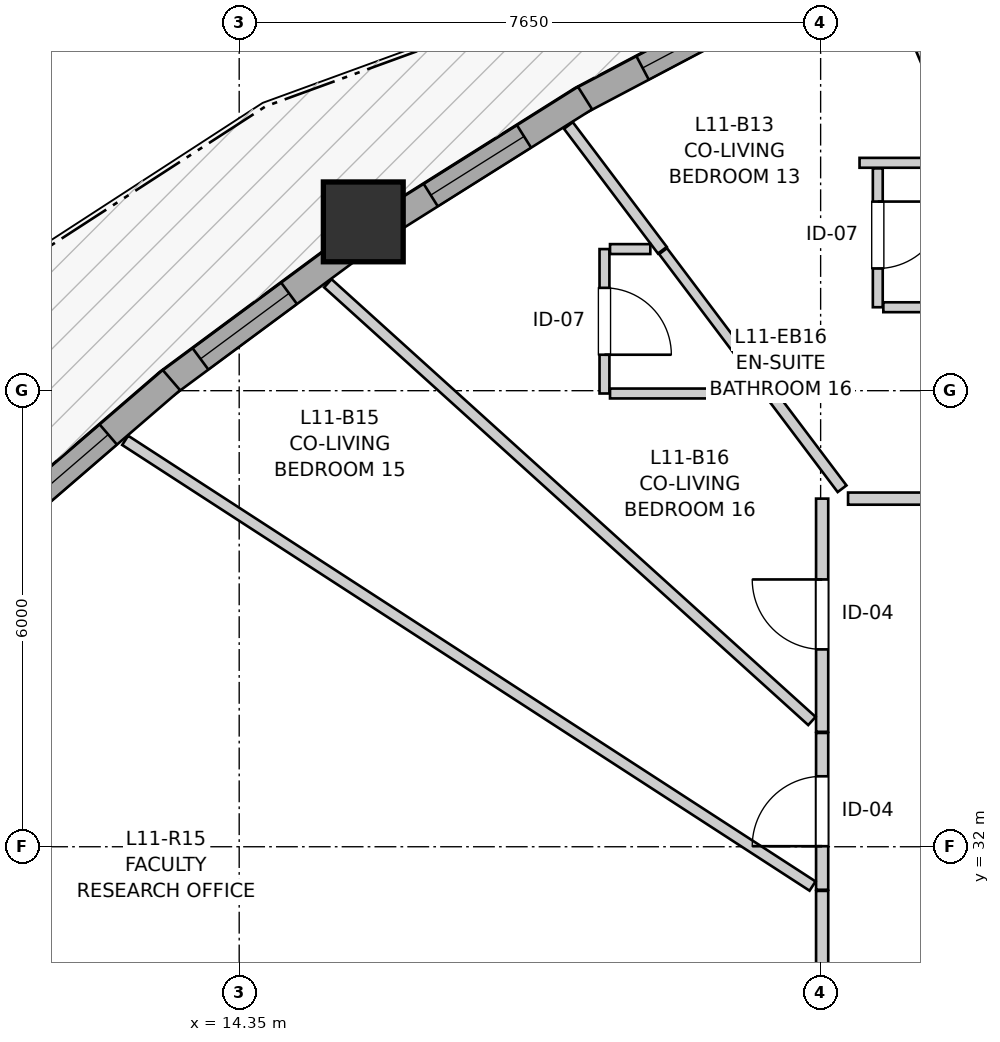
"""IFC4 building model, lengths in metres.
Left out: names, types, materials, properties, quantities, classifications, styles, units other than length and angle.
Written with IfcOpenShell. Run it as: python <this file> out.ifc"""

import sys

from ifc_helpers import new_model, si_unit, direction, frame, frame_2d, origin, origin_2d, place, context, subcontext, project, spatial, rectangle, extrude, source, transform, mapped, element, fill, save


model = new_model("IFC4")
c1 = context("Model", 3, precision=1e-05, world=origin(), true_north=direction((0.0, 1.0)))
c2 = subcontext(c1, "Body", "Model", "MODEL_VIEW")
j1 = project(units=[si_unit("LENGTHUNIT", "METRE"), si_unit("PLANEANGLEUNIT", "RADIAN")], contexts=[c1])
p1 = place(None, origin())
s1 = spatial("IfcSite", under=j1, at=p1, CompositionType="ELEMENT")
p2 = place(p1, origin())
s2 = spatial("IfcBuilding", under=s1, at=p2, CompositionType="ELEMENT")
p3 = place(p2, frame((0.0, 0.0, 39.8)))
s3 = spatial("IfcBuildingStorey", under=s2, at=p3, CompositionType="ELEMENT", Elevation=39.8)
m1 = source(origin(), c2, "Body", "SweptSolid", [
    extrude(rectangle(XDim=1.05, YDim=1.05, at=origin_2d()), origin(), (0.0, 0.0, 1.0), 2.94),
])
p4 = place(p3, frame((15.983, 40.221, 0.0), z_axis=(0.0, 0.0, 1.0), x_axis=(1.0, 0.0, 0.0)))
e1 = element("IfcColumn", 1, at=p4, inside=s3, PredefinedType="COLUMN", context=c2, shape_type="MappedRepresentation", body=[
    mapped(m1, transform((0.0, 0.0, 0.0), x_axis=(1.0, 0.0, 0.0), y_axis=(0.0, 1.0, 0.0), z_axis=(0.0, 0.0, 1.0), scale=1.0)),
])
p5 = place(p3, frame((21.757, 43.354, 0.0), z_axis=(0.0, 0.0, 1.0), x_axis=(-0.884394035355, -0.466741031224, 0.0)))
e2 = element("IfcWall", 2, at=p5, inside=s3, PredefinedType="SOLIDWALL", context=c2, shape_type="SweptSolid", body=[
    extrude(rectangle(XDim=3.317, YDim=0.35, at=frame_2d((1.659, 0.0))), origin(), (0.0, 0.0, 1.0), 2.42),
])
p6 = place(p5, frame((0.924, 0.0, 0.82)))
e3 = element("IfcOpeningElement", 3, at=p6, cuts=e2, PredefinedType="OPENING", context=c2, shape_type="SweptSolid", body=[
    extrude(rectangle(XDim=1.45, YDim=1.25, at=frame_2d((0.725, 0.625))), frame((0.0, 0.185, 0.0), z_axis=(0.0, -1.0, 0.0), x_axis=(1.0, 0.0, 0.0)), (0.0, 0.0, 1.0), 0.37),
])
p7 = place(p3, frame((18.901, 41.85, 0.0), z_axis=(0.0, 0.0, 1.0), x_axis=(-0.846436796602, -0.532489201167, 0.0)))
e4 = element("IfcWall", 4, at=p7, inside=s3, PredefinedType="SOLIDWALL", context=c2, shape_type="SweptSolid", body=[
    extrude(rectangle(XDim=3.038, YDim=0.35, at=frame_2d((1.519, 0.0))), origin(), (0.0, 0.0, 1.0), 2.42),
])
p8 = place(p7, frame((0.948, 0.0, 0.82)))
e5 = element("IfcOpeningElement", 5, at=p8, cuts=e4, PredefinedType="OPENING", context=c2, shape_type="SweptSolid", body=[
    extrude(rectangle(XDim=1.45, YDim=1.25, at=frame_2d((0.725, 0.625))), frame((0.0, 0.185, 0.0), z_axis=(0.0, -1.0, 0.0), x_axis=(1.0, 0.0, 0.0)), (0.0, 0.0, 1.0), 0.37),
])
p9 = place(p3, frame((15.846, 39.902, 0.0), z_axis=(0.0, 0.0, 1.0), x_axis=(-0.803789189233, -0.594914228501, 0.0)))
e6 = element("IfcWall", 6, at=p9, inside=s3, PredefinedType="SOLIDWALL", context=c2, shape_type="SweptSolid", body=[
    extrude(rectangle(XDim=3.056, YDim=0.35, at=frame_2d((1.528, 0.0))), origin(), (0.0, 0.0, 1.0), 2.42),
])
p10 = place(p9, frame((1.044, 0.0, 0.82)))
e7 = element("IfcOpeningElement", 7, at=p10, cuts=e6, PredefinedType="OPENING", context=c2, shape_type="SweptSolid", body=[
    extrude(rectangle(XDim=1.45, YDim=1.25, at=frame_2d((0.725, 0.625))), frame((0.0, 0.185, 0.0), z_axis=(0.0, -1.0, 0.0), x_axis=(1.0, 0.0, 0.0)), (0.0, 0.0, 1.0), 0.37),
])
p11 = place(p3, frame((13.458, 38.139, 0.0), z_axis=(0.0, 0.0, 1.0), x_axis=(-0.757450680395, -0.652892385289, 0.0)))
e8 = element("IfcWall", 8, at=p11, inside=s3, PredefinedType="SOLIDWALL", context=c2, shape_type="SweptSolid", body=[
    extrude(rectangle(XDim=3.374, YDim=0.35, at=frame_2d((1.687, 0.0))), origin(), (0.0, 0.0, 1.0), 2.42),
])
p12 = place(p11, frame((1.097, 0.0, 0.82)))
e9 = element("IfcOpeningElement", 9, at=p12, cuts=e8, PredefinedType="OPENING", context=c2, shape_type="SweptSolid", body=[
    extrude(rectangle(XDim=1.95, YDim=1.4, at=frame_2d((0.975, 0.7))), frame((0.0, 0.185, 0.0), z_axis=(0.0, -1.0, 0.0), x_axis=(1.0, 0.0, 0.0)), (0.0, 0.0, 1.0), 0.37),
])
p13 = place(p3, frame((22.02, 27.85, 0.0), z_axis=(0.0, 0.0, 1.0), x_axis=(0.0, 1.0, 0.0)))
e10 = element("IfcWall", 10, at=p13, inside=s3, PredefinedType="PARTITIONING", context=c2, shape_type="SweptSolid", body=[
    extrude(rectangle(XDim=3.569, YDim=0.16, at=frame_2d((1.784, 0.0))), origin(), (0.0, 0.0, 1.0), 2.94),
])
p14 = place(p13, frame((1.325, 0.0, 0.0)))
e11 = element("IfcOpeningElement", 11, at=p14, cuts=e10, PredefinedType="OPENING", context=c2, shape_type="SweptSolid", body=[
    extrude(rectangle(XDim=0.96, YDim=2.1, at=frame_2d((0.48, 1.05))), frame((0.0, 0.09, 0.0), z_axis=(0.0, -1.0, 0.0), x_axis=(1.0, 0.0, 0.0)), (0.0, 0.0, 1.0), 0.18),
])
p15 = place(p3, frame((22.361, 36.58, 0.0), z_axis=(0.0, 0.0, 1.0), x_axis=(1.0, 0.0, 0.0)))
e12 = element("IfcWall", 12, at=p15, inside=s3, PredefinedType="PARTITIONING", context=c2, shape_type="SweptSolid", body=[
    extrude(rectangle(XDim=3.498, YDim=0.16, at=frame_2d((1.749, 0.0))), origin(), (0.0, 0.0, 1.0), 2.548),
])
p16 = place(p15, frame((1.291, 0.0, 0.0)))
e13 = element("IfcOpeningElement", 13, at=p16, cuts=e12, PredefinedType="OPENING", context=c2, shape_type="SweptSolid", body=[
    extrude(rectangle(XDim=0.92, YDim=2.1, at=frame_2d((0.46, 1.05))), frame((0.0, 0.09, 0.0), z_axis=(0.0, -1.0, 0.0), x_axis=(1.0, 0.0, 0.0)), (0.0, 0.0, 1.0), 0.18),
])
p17 = place(p3, frame((22.02, 33.512, 0.0), z_axis=(0.0, 0.0, 1.0), x_axis=(0.0, 1.0, 0.0)))
e14 = element("IfcWall", 14, at=p17, inside=s3, PredefinedType="PARTITIONING", context=c2, shape_type="SweptSolid", body=[
    extrude(rectangle(XDim=3.068, YDim=0.16, at=frame_2d((1.534, 0.0))), origin(), (0.0, 0.0, 1.0), 2.94),
])
p18 = place(p17, frame((1.084, 0.0, 0.0)))
e15 = element("IfcOpeningElement", 15, at=p18, cuts=e14, PredefinedType="OPENING", context=c2, shape_type="SweptSolid", body=[
    extrude(rectangle(XDim=0.92, YDim=2.1, at=frame_2d((0.46, 1.05))), frame((0.0, 0.09, 0.0), z_axis=(0.0, -1.0, 0.0), x_axis=(1.0, 0.0, 0.0)), (0.0, 0.0, 1.0), 0.18),
])
p19 = place(p3, frame((22.02, 31.434, 0.0), z_axis=(0.0, 0.0, 1.0), x_axis=(0.0, 1.0, 0.0)))
e16 = element("IfcWall", 16, at=p19, inside=s3, PredefinedType="PARTITIONING", context=c2, shape_type="SweptSolid", body=[
    extrude(rectangle(XDim=2.063, YDim=0.16, at=frame_2d((1.031, 0.0))), origin(), (0.0, 0.0, 1.0), 2.94),
])
p20 = place(p19, frame((0.573, 0.0, 0.0)))
e17 = element("IfcOpeningElement", 17, at=p20, cuts=e16, PredefinedType="OPENING", context=c2, shape_type="SweptSolid", body=[
    extrude(rectangle(XDim=0.92, YDim=2.1, at=frame_2d((0.46, 1.05))), frame((0.0, 0.09, 0.0), z_axis=(0.0, -1.0, 0.0), x_axis=(1.0, 0.0, 0.0)), (0.0, 0.0, 1.0), 0.18),
])
p21 = place(p3, frame((22.752, 40.925, 0.0), z_axis=(0.0, 0.0, 1.0), x_axis=(0.0, -1.0, 0.0)))
e18 = element("IfcWall", 18, at=p21, inside=s3, PredefinedType="PARTITIONING", context=c2, shape_type="SweptSolid", body=[
    extrude(rectangle(XDim=1.827, YDim=0.13, at=frame_2d((0.914, 0.0))), origin(), (0.0, 0.0, 1.0), 2.94),
])
p22 = place(p21, frame((0.437, 0.0, 0.0)))
e19 = element("IfcOpeningElement", 19, at=p22, cuts=e18, PredefinedType="OPENING", context=c2, shape_type="SweptSolid", body=[
    extrude(rectangle(XDim=0.88, YDim=2.05, at=frame_2d((0.44, 1.025))), frame((0.0, 0.075, 0.0), z_axis=(0.0, -1.0, 0.0), x_axis=(1.0, 0.0, 0.0)), (0.0, 0.0, 1.0), 0.15),
])
p23 = place(p3, frame((19.156, 39.863, 0.0), z_axis=(0.0, 0.0, 1.0), x_axis=(0.0, -1.0, 0.0)))
e20 = element("IfcWall", 20, at=p23, inside=s3, PredefinedType="PARTITIONING", context=c2, shape_type="SweptSolid", body=[
    extrude(rectangle(XDim=1.9, YDim=0.13, at=frame_2d((0.95, 0.0))), origin(), (0.0, 0.0, 1.0), 2.94),
])
p24 = place(p23, frame((0.51, 0.0, 0.0)))
e21 = element("IfcOpeningElement", 21, at=p24, cuts=e20, PredefinedType="OPENING", context=c2, shape_type="SweptSolid", body=[
    extrude(rectangle(XDim=0.88, YDim=2.05, at=frame_2d((0.44, 1.025))), frame((0.0, 0.075, 0.0), z_axis=(0.0, -1.0, 0.0), x_axis=(1.0, 0.0, 0.0)), (0.0, 0.0, 1.0), 0.15),
])
p25 = place(p3, frame((12.85, 37.347, 0.0), z_axis=(0.0, 0.0, 1.0), x_axis=(0.839070272759, -0.544023048567, 0.0)))
e22 = element("IfcWall", 22, at=p25, inside=s3, PredefinedType="PARTITIONING", context=c2, shape_type="SweptSolid", body=[
    extrude(rectangle(XDim=10.779, YDim=0.145, at=frame_2d((5.389, 0.0))), origin(), (0.0, 0.0, 1.0), 2.94),
])
p26 = place(p3, frame((15.516, 39.413, 0.0), z_axis=(0.0, 0.0, 1.0), x_axis=(0.741796419009, -0.670625135784, 0.0)))
e23 = element("IfcWall", 23, at=p26, inside=s3, PredefinedType="PARTITIONING", context=c2, shape_type="SweptSolid", body=[
    extrude(rectangle(XDim=8.586, YDim=0.145, at=frame_2d((4.293, 0.0))), origin(), (0.0, 0.0, 1.0), 2.94),
])
p27 = place(p3, frame((22.841, 43.626, 0.0), z_axis=(0.0, 0.0, 1.0), x_axis=(0.392030625658, -0.919952166445, 0.0)))
e24 = element("IfcWall", 24, at=p27, inside=s3, PredefinedType="PARTITIONING", context=c2, shape_type="SweptSolid", body=[
    extrude(rectangle(XDim=2.747, YDim=0.145, at=frame_2d((1.374, 0.0))), origin(), (0.0, 0.0, 1.0), 2.94),
])
p28 = place(p3, frame((20.941, 38.49, 0.0), z_axis=(0.0, 0.0, 1.0), x_axis=(0.601733790382, -0.798696716853, 0.0)))
e25 = element("IfcWall", 25, at=p28, inside=s3, PredefinedType="PARTITIONING", context=c2, shape_type="SweptSolid", body=[
    extrude(rectangle(XDim=2.229, YDim=0.145, at=frame_2d((1.114, 0.0))), origin(), (0.0, 0.0, 1.0), 2.94),
])
p29 = place(p3, frame((18.681, 41.489, 0.0), z_axis=(0.0, 0.0, 1.0), x_axis=(0.601842551228, -0.79861476541, 0.0)))
e26 = element("IfcWall", 26, at=p29, inside=s3, PredefinedType="PARTITIONING", context=c2, shape_type="SweptSolid", body=[
    extrude(rectangle(XDim=2.055, YDim=0.145, at=frame_2d((1.027, 0.0))), origin(), (0.0, 0.0, 1.0), 2.94),
])
p30 = place(p3, frame((22.825, 39.098, 0.0), z_axis=(0.0, 0.0, 1.0), x_axis=(1.0, 0.0, 0.0)))
e27 = element("IfcWall", 27, at=p30, inside=s3, PredefinedType="PARTITIONING", context=c2, shape_type="SweptSolid", body=[
    extrude(rectangle(XDim=1.727, YDim=0.13, at=frame_2d((0.864, 0.0))), origin(), (0.0, 0.0, 1.0), 2.94),
])
p31 = place(p3, frame((19.229, 37.963, 0.0), z_axis=(0.0, 0.0, 1.0), x_axis=(1.0, 0.0, 0.0)))
e28 = element("IfcWall", 28, at=p31, inside=s3, PredefinedType="PARTITIONING", context=c2, shape_type="SweptSolid", body=[
    extrude(rectangle(XDim=1.727, YDim=0.13, at=frame_2d((0.864, 0.0))), origin(), (0.0, 0.0, 1.0), 2.508),
])
p32 = place(p3, frame((19.927, 39.836, 0.0), z_axis=(0.0, 0.0, 1.0), x_axis=(0.601846185739, -0.798612026401, 0.0)))
e29 = element("IfcWall", 29, at=p32, inside=s3, PredefinedType="PARTITIONING", context=c2, shape_type="SweptSolid", body=[
    extrude(rectangle(XDim=1.67, YDim=0.13, at=frame_2d((0.835, 0.0))), origin(), (0.0, 0.0, 1.0), 2.94),
])
p33 = place(p3, frame((22.512, 40.998, 0.0), z_axis=(0.0, 0.0, 1.0), x_axis=(1.0, 0.0, 0.0)))
e30 = element("IfcWall", 30, at=p33, inside=s3, PredefinedType="PARTITIONING", context=c2, shape_type="SweptSolid", body=[
    extrude(rectangle(XDim=1.689, YDim=0.13, at=frame_2d((0.844, 0.0))), origin(), (0.0, 0.0, 1.0), 2.94),
])
p34 = place(p3, frame((19.229, 39.863, 0.0), z_axis=(0.0, 0.0, 1.0), x_axis=(1.0, 0.0, 0.0)))
e31 = element("IfcWall", 31, at=p34, inside=s3, PredefinedType="PARTITIONING", context=c2, shape_type="SweptSolid", body=[
    extrude(rectangle(XDim=0.53, YDim=0.13, at=frame_2d((0.265, 0.0))), origin(), (0.0, 0.0, 1.0), 2.94),
])
p35 = place(p3, frame((20.956, 37.963, 0.0), z_axis=(0.0, 0.0, 1.0), x_axis=(0.0, 1.0, 0.0)))
e32 = element("IfcWall", 32, at=p35, inside=s3, PredefinedType="PARTITIONING", context=c2, shape_type="SweptSolid", body=[
    extrude(rectangle(XDim=0.417, YDim=0.13, at=frame_2d((0.208, 0.0))), origin(), (0.0, 0.0, 1.0), 2.94),
])
m2 = source(origin(), c2, "Body", "SweptSolid", [
    extrude(rectangle(XDim=1.45, YDim=1.25, at=frame_2d((0.725, 0.625))), frame((0.0, 0.03, 0.0), z_axis=(0.0, -1.0, 0.0), x_axis=(1.0, 0.0, 0.0)), (0.0, 0.0, 1.0), 0.06),
])
p36 = place(p6, origin())
e33 = element("IfcWindow", 33, at=p36, inside=s3, PartitioningType="SINGLE_PANEL", PredefinedType="WINDOW", context=c2, shape_type="MappedRepresentation", body=[
    mapped(m2, transform((0.0, 0.0, 0.0), x_axis=(1.0, 0.0, 0.0), y_axis=(0.0, 1.0, 0.0), z_axis=(0.0, 0.0, 1.0), scale=1.0)),
])
fill(e3, e33)
p37 = place(p8, origin())
e34 = element("IfcWindow", 34, at=p37, inside=s3, PartitioningType="SINGLE_PANEL", PredefinedType="WINDOW", context=c2, shape_type="MappedRepresentation", body=[
    mapped(m2, transform((0.0, 0.0, 0.0), x_axis=(1.0, 0.0, 0.0), y_axis=(0.0, 1.0, 0.0), z_axis=(0.0, 0.0, 1.0), scale=1.0)),
])
fill(e5, e34)
p38 = place(p10, origin())
e35 = element("IfcWindow", 35, at=p38, inside=s3, PartitioningType="SINGLE_PANEL", PredefinedType="WINDOW", context=c2, shape_type="MappedRepresentation", body=[
    mapped(m2, transform((0.0, 0.0, 0.0), x_axis=(1.0, 0.0, 0.0), y_axis=(0.0, 1.0, 0.0), z_axis=(0.0, 0.0, 1.0), scale=1.0)),
])
fill(e7, e35)
m3 = source(origin(), c2, "Body", "SweptSolid", [
    extrude(rectangle(XDim=1.95, YDim=1.4, at=frame_2d((0.975, 0.7))), frame((0.0, 0.03, 0.0), z_axis=(0.0, -1.0, 0.0), x_axis=(1.0, 0.0, 0.0)), (0.0, 0.0, 1.0), 0.06),
])
p39 = place(p12, origin())
e36 = element("IfcWindow", 36, at=p39, inside=s3, PartitioningType="SINGLE_PANEL", PredefinedType="WINDOW", context=c2, shape_type="MappedRepresentation", body=[
    mapped(m3, transform((0.0, 0.0, 0.0), x_axis=(1.0, 0.0, 0.0), y_axis=(0.0, 1.0, 0.0), z_axis=(0.0, 0.0, 1.0), scale=1.0)),
])
fill(e9, e36)
m4 = source(origin(), c2, "Body", "SweptSolid", [
    extrude(rectangle(XDim=0.92, YDim=2.1, at=frame_2d((0.46, 1.05))), frame((0.0, 0.025, 0.0), z_axis=(0.0, -1.0, 0.0), x_axis=(1.0, 0.0, 0.0)), (0.0, 0.0, 1.0), 0.05),
])
p40 = place(p18, origin())
e37 = element("IfcDoor", 37, at=p40, inside=s3, OperationType="SINGLE_SWING_RIGHT", PredefinedType="DOOR", context=c2, shape_type="MappedRepresentation", body=[
    mapped(m4, transform((0.0, 0.0, 0.0), x_axis=(1.0, 0.0, 0.0), y_axis=(0.0, 1.0, 0.0), z_axis=(0.0, 0.0, 1.0), scale=1.0)),
])
fill(e15, e37)
p41 = place(p20, origin())
e38 = element("IfcDoor", 38, at=p41, inside=s3, OperationType="SINGLE_SWING_LEFT", PredefinedType="DOOR", context=c2, shape_type="MappedRepresentation", body=[
    mapped(m4, transform((0.0, 0.0, 0.0), x_axis=(1.0, 0.0, 0.0), y_axis=(0.0, 1.0, 0.0), z_axis=(0.0, 0.0, 1.0), scale=1.0)),
])
fill(e17, e38)
m5 = source(origin(), c2, "Body", "SweptSolid", [
    extrude(rectangle(XDim=0.88, YDim=2.05, at=frame_2d((0.44, 1.025))), frame((0.0, 0.025, 0.0), z_axis=(0.0, -1.0, 0.0), x_axis=(1.0, 0.0, 0.0)), (0.0, 0.0, 1.0), 0.05),
])
p42 = place(p22, origin())
e39 = element("IfcDoor", 39, at=p42, inside=s3, OperationType="SINGLE_SWING_LEFT", PredefinedType="DOOR", context=c2, shape_type="MappedRepresentation", body=[
    mapped(m5, transform((0.0, 0.0, 0.0), x_axis=(1.0, 0.0, 0.0), y_axis=(0.0, 1.0, 0.0), z_axis=(0.0, 0.0, 1.0), scale=1.0)),
])
fill(e19, e39)
p43 = place(p24, origin())
e40 = element("IfcDoor", 40, at=p43, inside=s3, OperationType="SINGLE_SWING_RIGHT", PredefinedType="DOOR", context=c2, shape_type="MappedRepresentation", body=[
    mapped(m5, transform((0.0, 0.0, 0.0), x_axis=(1.0, 0.0, 0.0), y_axis=(0.0, 1.0, 0.0), z_axis=(0.0, 0.0, 1.0), scale=1.0)),
])
fill(e21, e40)
save(model, sys.argv[1])
